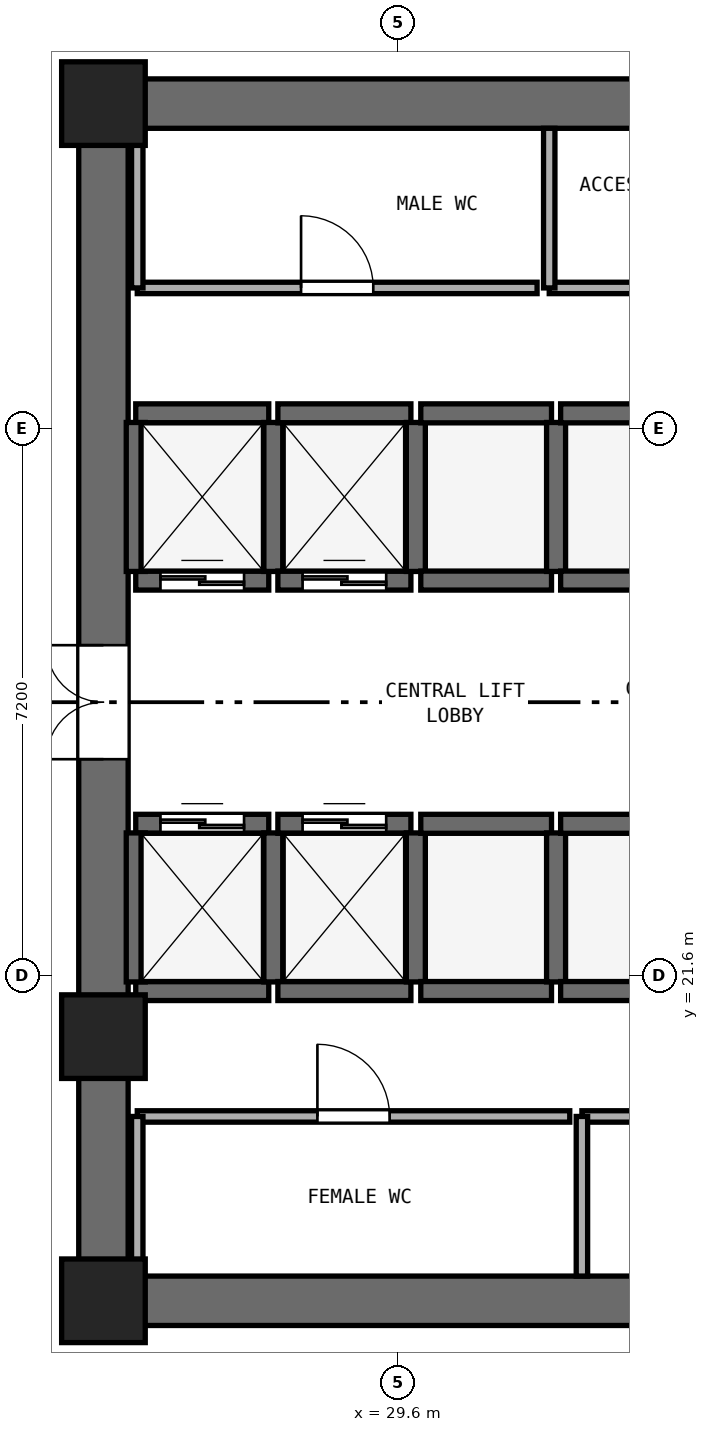
"""IFC4 building model, lengths in metres.
Left out: names, types, materials, properties, quantities, classifications, styles, units other than length and angle.
Written with IfcOpenShell. Run it as: python <this file> out.ifc"""

import sys

from ifc_helpers import new_model, si_unit, direction, frame, frame_2d, origin, origin_2d, place, context, subcontext, project, spatial, rectangle, extrude, element, fill, save


model = new_model("IFC4")
c1 = context("Model", 3, precision=1e-05, world=origin(), true_north=direction((0.0, 1.0)))
c2 = subcontext(c1, "Body", "Model", "MODEL_VIEW")
j1 = project(units=[si_unit("LENGTHUNIT", "METRE"), si_unit("PLANEANGLEUNIT", "RADIAN")], contexts=[c1])
p1 = place(None, origin())
s1 = spatial("IfcSite", under=j1, at=p1, CompositionType="ELEMENT")
p2 = place(p1, origin())
s2 = spatial("IfcBuilding", under=s1, at=p2, CompositionType="ELEMENT")
p3 = place(p2, frame((0.0, 0.0, 44.0)))
s3 = spatial("IfcBuildingStorey", under=s2, at=p3, CompositionType="ELEMENT", Elevation=44.0)
for number, where, z_axis, x_axis in (
    (1, (25.4, 17.325, 0.0), (0.0, 0.0, 1.0), (1.0, 0.0, 0.0)),
    (2, (25.4, 33.075, 0.0), (0.0, 0.0, 1.0), (1.0, 0.0, 0.0)),
):
    element("IfcWall", number, at=place(p3, frame(where, z_axis=z_axis, x_axis=x_axis)), inside=s3, PredefinedType="SHEAR", context=c2, shape_type="SweptSolid", body=[
        extrude(rectangle(XDim=23.2, YDim=0.65, at=frame_2d((11.6, 0.0))), origin(), (0.0, 0.0, 1.0), 3.525),
    ])
p4 = place(p3, frame((25.725, 17.65, 0.0), z_axis=(0.0, 0.0, 1.0), x_axis=(0.0, 1.0, 0.0)))
e3 = element("IfcWall", 3, at=p4, inside=s3, PredefinedType="SHEAR", context=c2, shape_type="SweptSolid", body=[
    extrude(rectangle(XDim=15.1, YDim=0.65, at=frame_2d((7.55, 0.0))), origin(), (0.0, 0.0, 1.0), 3.525),
])
p5 = place(p4, frame((6.8, 0.0, 0.0)))
e4 = element("IfcOpeningElement", 4, at=p5, cuts=e3, PredefinedType="OPENING", context=c2, shape_type="SweptSolid", body=[
    extrude(rectangle(XDim=1.5, YDim=2.15, at=frame_2d((0.75, 1.075))), frame((0.0, 0.335, 0.0), z_axis=(0.0, -1.0, 0.0), x_axis=(1.0, 0.0, 0.0)), (0.0, 0.0, 1.0), 0.67),
])
for number, where, z_axis, x_axis in (
    (5, (25.725, 17.325, 0.0), (0.0, 0.0, 1.0), (1.0, 0.0, 0.0)),
    (6, (25.725, 33.075, 0.0), (0.0, 0.0, 1.0), (1.0, 0.0, 0.0)),
    (7, (25.725, 20.8, 0.0), (0.0, 0.0, 1.0), (1.0, 0.0, 0.0)),
):
    element("IfcColumn", number, at=place(p3, frame(where, z_axis=z_axis, x_axis=x_axis)), inside=s3, PredefinedType="PILASTER", context=c2, shape_type="SweptSolid", body=[
        extrude(rectangle(XDim=1.1, YDim=1.1, at=origin_2d()), origin(), (0.0, 0.0, 1.0), 3.8),
    ])
p6 = place(p3, frame((26.15, 26.8, 0.0), z_axis=(0.0, 0.0, 1.0), x_axis=(1.0, 0.0, 0.0)))
e8 = element("IfcWall", 8, at=p6, inside=s3, PredefinedType="SHEAR", context=c2, shape_type="SweptSolid", body=[
    extrude(rectangle(XDim=1.75, YDim=0.25, at=frame_2d((0.875, 0.0))), origin(), (0.0, 0.0, 1.0), 3.525),
])
p7 = place(p6, frame((0.325, 0.0, 0.0)))
e9 = element("IfcOpeningElement", 9, at=p7, cuts=e8, PredefinedType="OPENING", context=c2, shape_type="SweptSolid", body=[
    extrude(rectangle(XDim=1.1, YDim=2.15, at=frame_2d((0.55, 1.075))), frame((0.0, 0.135, 0.0), z_axis=(0.0, -1.0, 0.0), x_axis=(1.0, 0.0, 0.0)), (0.0, 0.0, 1.0), 0.27),
])
p8 = place(p3, frame((26.15, 29.0, 0.0), z_axis=(0.0, 0.0, 1.0), x_axis=(1.0, 0.0, 0.0)))
e10 = element("IfcWall", 10, at=p8, inside=s3, PredefinedType="SHEAR", context=c2, shape_type="SweptSolid", body=[
    extrude(rectangle(XDim=1.75, YDim=0.25, at=frame_2d((0.875, 0.0))), origin(), (0.0, 0.0, 1.0), 3.525),
])
for number, where, z_axis, x_axis in (
    (11, (26.15, 26.92, 0.0), (0.0, 0.0, 1.0), (0.0, 1.0, 0.0)),
    (12, (27.96, 26.92, 0.0), (0.0, 0.0, 1.0), (0.0, 1.0, 0.0)),
):
    element("IfcWall", number, at=place(p3, frame(where, z_axis=z_axis, x_axis=x_axis)), inside=s3, PredefinedType="SHEAR", context=c2, shape_type="SweptSolid", body=[
        extrude(rectangle(XDim=1.96, YDim=0.25, at=frame_2d((0.98, 0.0))), origin(), (0.0, 0.0, 1.0), 3.525),
    ])
p9 = place(p3, frame((28.02, 26.8, 0.0), z_axis=(0.0, 0.0, 1.0), x_axis=(1.0, 0.0, 0.0)))
e13 = element("IfcWall", 13, at=p9, inside=s3, PredefinedType="SHEAR", context=c2, shape_type="SweptSolid", body=[
    extrude(rectangle(XDim=1.75, YDim=0.25, at=frame_2d((0.875, 0.0))), origin(), (0.0, 0.0, 1.0), 3.525),
])
p10 = place(p9, frame((0.325, 0.0, 0.0)))
e14 = element("IfcOpeningElement", 14, at=p10, cuts=e13, PredefinedType="OPENING", context=c2, shape_type="SweptSolid", body=[
    extrude(rectangle(XDim=1.1, YDim=2.15, at=frame_2d((0.55, 1.075))), frame((0.0, 0.135, 0.0), z_axis=(0.0, -1.0, 0.0), x_axis=(1.0, 0.0, 0.0)), (0.0, 0.0, 1.0), 0.27),
])
p11 = place(p3, frame((28.02, 29.0, 0.0), z_axis=(0.0, 0.0, 1.0), x_axis=(1.0, 0.0, 0.0)))
e15 = element("IfcWall", 15, at=p11, inside=s3, PredefinedType="SHEAR", context=c2, shape_type="SweptSolid", body=[
    extrude(rectangle(XDim=1.75, YDim=0.25, at=frame_2d((0.875, 0.0))), origin(), (0.0, 0.0, 1.0), 3.525),
])
p12 = place(p3, frame((29.835, 26.92, 0.0), z_axis=(0.0, 0.0, 1.0), x_axis=(0.0, 1.0, 0.0)))
e16 = element("IfcWall", 16, at=p12, inside=s3, PredefinedType="SHEAR", context=c2, shape_type="SweptSolid", body=[
    extrude(rectangle(XDim=1.96, YDim=0.25, at=frame_2d((0.98, 0.0))), origin(), (0.0, 0.0, 1.0), 3.525),
])
p13 = place(p3, frame((26.15, 21.4, 0.0), z_axis=(0.0, 0.0, 1.0), x_axis=(1.0, 0.0, 0.0)))
e17 = element("IfcWall", 17, at=p13, inside=s3, PredefinedType="SHEAR", context=c2, shape_type="SweptSolid", body=[
    extrude(rectangle(XDim=1.75, YDim=0.25, at=frame_2d((0.875, 0.0))), origin(), (0.0, 0.0, 1.0), 3.525),
])
p14 = place(p3, frame((26.15, 23.6, 0.0), z_axis=(0.0, 0.0, 1.0), x_axis=(1.0, 0.0, 0.0)))
e18 = element("IfcWall", 18, at=p14, inside=s3, PredefinedType="SHEAR", context=c2, shape_type="SweptSolid", body=[
    extrude(rectangle(XDim=1.75, YDim=0.25, at=frame_2d((0.875, 0.0))), origin(), (0.0, 0.0, 1.0), 3.525),
])
p15 = place(p14, frame((0.325, 0.0, 0.0)))
e19 = element("IfcOpeningElement", 19, at=p15, cuts=e18, PredefinedType="OPENING", context=c2, shape_type="SweptSolid", body=[
    extrude(rectangle(XDim=1.1, YDim=2.15, at=frame_2d((0.55, 1.075))), frame((0.0, 0.135, 0.0), z_axis=(0.0, -1.0, 0.0), x_axis=(1.0, 0.0, 0.0)), (0.0, 0.0, 1.0), 0.27),
])
for number, where, z_axis, x_axis in (
    (20, (26.15, 21.52, 0.0), (0.0, 0.0, 1.0), (0.0, 1.0, 0.0)),
    (21, (27.96, 21.52, 0.0), (0.0, 0.0, 1.0), (0.0, 1.0, 0.0)),
):
    element("IfcWall", number, at=place(p3, frame(where, z_axis=z_axis, x_axis=x_axis)), inside=s3, PredefinedType="SHEAR", context=c2, shape_type="SweptSolid", body=[
        extrude(rectangle(XDim=1.96, YDim=0.25, at=frame_2d((0.98, 0.0))), origin(), (0.0, 0.0, 1.0), 3.525),
    ])
p16 = place(p3, frame((28.02, 21.4, 0.0), z_axis=(0.0, 0.0, 1.0), x_axis=(1.0, 0.0, 0.0)))
e22 = element("IfcWall", 22, at=p16, inside=s3, PredefinedType="SHEAR", context=c2, shape_type="SweptSolid", body=[
    extrude(rectangle(XDim=1.75, YDim=0.25, at=frame_2d((0.875, 0.0))), origin(), (0.0, 0.0, 1.0), 3.525),
])
p17 = place(p3, frame((28.02, 23.6, 0.0), z_axis=(0.0, 0.0, 1.0), x_axis=(1.0, 0.0, 0.0)))
e23 = element("IfcWall", 23, at=p17, inside=s3, PredefinedType="SHEAR", context=c2, shape_type="SweptSolid", body=[
    extrude(rectangle(XDim=1.75, YDim=0.25, at=frame_2d((0.875, 0.0))), origin(), (0.0, 0.0, 1.0), 3.525),
])
p18 = place(p17, frame((0.325, 0.0, 0.0)))
e24 = element("IfcOpeningElement", 24, at=p18, cuts=e23, PredefinedType="OPENING", context=c2, shape_type="SweptSolid", body=[
    extrude(rectangle(XDim=1.1, YDim=2.15, at=frame_2d((0.55, 1.075))), frame((0.0, 0.135, 0.0), z_axis=(0.0, -1.0, 0.0), x_axis=(1.0, 0.0, 0.0)), (0.0, 0.0, 1.0), 0.27),
])
p19 = place(p3, frame((29.835, 21.52, 0.0), z_axis=(0.0, 0.0, 1.0), x_axis=(0.0, 1.0, 0.0)))
e25 = element("IfcWall", 25, at=p19, inside=s3, PredefinedType="SHEAR", context=c2, shape_type="SweptSolid", body=[
    extrude(rectangle(XDim=1.96, YDim=0.25, at=frame_2d((0.98, 0.0))), origin(), (0.0, 0.0, 1.0), 3.525),
])
for number, where, z_axis, x_axis in (
    (26, (29.9, 21.4, 0.0), (0.0, 0.0, 1.0), (1.0, 0.0, 0.0)),
    (27, (29.9, 23.6, 0.0), (0.0, 0.0, 1.0), (1.0, 0.0, 0.0)),
):
    element("IfcWall", number, at=place(p3, frame(where, z_axis=z_axis, x_axis=x_axis)), inside=s3, PredefinedType="SHEAR", context=c2, shape_type="SweptSolid", body=[
        extrude(rectangle(XDim=1.72, YDim=0.25, at=frame_2d((0.86, 0.0))), origin(), (0.0, 0.0, 1.0), 3.525),
    ])
p20 = place(p3, frame((31.68, 21.52, 0.0), z_axis=(0.0, 0.0, 1.0), x_axis=(0.0, 1.0, 0.0)))
e28 = element("IfcWall", 28, at=p20, inside=s3, PredefinedType="SHEAR", context=c2, shape_type="SweptSolid", body=[
    extrude(rectangle(XDim=1.96, YDim=0.25, at=frame_2d((0.98, 0.0))), origin(), (0.0, 0.0, 1.0), 3.525),
])
for number, where, z_axis, x_axis in (
    (29, (31.74, 21.4, 0.0), (0.0, 0.0, 1.0), (1.0, 0.0, 0.0)),
    (30, (31.74, 23.6, 0.0), (0.0, 0.0, 1.0), (1.0, 0.0, 0.0)),
):
    element("IfcWall", number, at=place(p3, frame(where, z_axis=z_axis, x_axis=x_axis)), inside=s3, PredefinedType="SHEAR", context=c2, shape_type="SweptSolid", body=[
        extrude(rectangle(XDim=1.72, YDim=0.25, at=frame_2d((0.86, 0.0))), origin(), (0.0, 0.0, 1.0), 3.525),
    ])
for number, where, z_axis, x_axis in (
    (31, (29.9, 26.8, 0.0), (0.0, 0.0, 1.0), (1.0, 0.0, 0.0)),
    (32, (29.9, 29.0, 0.0), (0.0, 0.0, 1.0), (1.0, 0.0, 0.0)),
):
    element("IfcWall", number, at=place(p3, frame(where, z_axis=z_axis, x_axis=x_axis)), inside=s3, PredefinedType="SHEAR", context=c2, shape_type="SweptSolid", body=[
        extrude(rectangle(XDim=1.72, YDim=0.25, at=frame_2d((0.86, 0.0))), origin(), (0.0, 0.0, 1.0), 3.525),
    ])
p21 = place(p3, frame((31.68, 26.92, 0.0), z_axis=(0.0, 0.0, 1.0), x_axis=(0.0, 1.0, 0.0)))
e33 = element("IfcWall", 33, at=p21, inside=s3, PredefinedType="SHEAR", context=c2, shape_type="SweptSolid", body=[
    extrude(rectangle(XDim=1.96, YDim=0.25, at=frame_2d((0.98, 0.0))), origin(), (0.0, 0.0, 1.0), 3.525),
])
for number, where, z_axis, x_axis in (
    (34, (31.74, 26.8, 0.0), (0.0, 0.0, 1.0), (1.0, 0.0, 0.0)),
    (35, (31.74, 29.0, 0.0), (0.0, 0.0, 1.0), (1.0, 0.0, 0.0)),
):
    element("IfcWall", number, at=place(p3, frame(where, z_axis=z_axis, x_axis=x_axis)), inside=s3, PredefinedType="SHEAR", context=c2, shape_type="SweptSolid", body=[
        extrude(rectangle(XDim=1.72, YDim=0.25, at=frame_2d((0.86, 0.0))), origin(), (0.0, 0.0, 1.0), 3.525),
    ])
p22 = place(p3, frame((26.17, 30.65, 0.0), z_axis=(0.0, 0.0, 1.0), x_axis=(1.0, 0.0, 0.0)))
e36 = element("IfcWall", 36, at=p22, inside=s3, PredefinedType="PARTITIONING", context=c2, shape_type="SweptSolid", body=[
    extrude(rectangle(XDim=5.26, YDim=0.15, at=frame_2d((2.63, 0.0))), origin(), (0.0, 0.0, 1.0), 3.525),
])
p23 = place(p22, frame((2.155, 0.0, 0.0)))
e37 = element("IfcOpeningElement", 37, at=p23, cuts=e36, PredefinedType="OPENING", context=c2, shape_type="SweptSolid", body=[
    extrude(rectangle(XDim=0.95, YDim=2.1, at=frame_2d((0.475, 1.05))), frame((0.0, 0.085, 0.0), z_axis=(0.0, -1.0, 0.0), x_axis=(1.0, 0.0, 0.0)), (0.0, 0.0, 1.0), 0.17),
])
p24 = place(p3, frame((26.17, 30.65, 0.0), z_axis=(0.0, 0.0, 1.0), x_axis=(0.0, 1.0, 0.0)))
e38 = element("IfcWall", 38, at=p24, inside=s3, PredefinedType="PARTITIONING", context=c2, shape_type="SweptSolid", body=[
    extrude(rectangle(XDim=2.1, YDim=0.15, at=frame_2d((1.05, 0.0))), origin(), (0.0, 0.0, 1.0), 3.525),
])
p25 = place(p3, frame((31.59, 30.65, 0.0), z_axis=(0.0, 0.0, 1.0), x_axis=(1.0, 0.0, 0.0)))
e39 = element("IfcWall", 39, at=p25, inside=s3, PredefinedType="PARTITIONING", context=c2, shape_type="SweptSolid", body=[
    extrude(rectangle(XDim=5.26, YDim=0.15, at=frame_2d((2.63, 0.0))), origin(), (0.0, 0.0, 1.0), 3.525),
])
p26 = place(p25, frame((2.155, 0.0, 0.0)))
e40 = element("IfcOpeningElement", 40, at=p26, cuts=e39, PredefinedType="OPENING", context=c2, shape_type="SweptSolid", body=[
    extrude(rectangle(XDim=0.95, YDim=2.1, at=frame_2d((0.475, 1.05))), frame((0.0, 0.085, 0.0), z_axis=(0.0, -1.0, 0.0), x_axis=(1.0, 0.0, 0.0)), (0.0, 0.0, 1.0), 0.17),
])
p27 = place(p3, frame((31.59, 30.65, 0.0), z_axis=(0.0, 0.0, 1.0), x_axis=(0.0, 1.0, 0.0)))
e41 = element("IfcWall", 41, at=p27, inside=s3, PredefinedType="PARTITIONING", context=c2, shape_type="SweptSolid", body=[
    extrude(rectangle(XDim=2.1, YDim=0.15, at=frame_2d((1.05, 0.0))), origin(), (0.0, 0.0, 1.0), 3.525),
])
p28 = place(p3, frame((26.17, 19.75, 0.0), z_axis=(0.0, 0.0, 1.0), x_axis=(1.0, 0.0, 0.0)))
e42 = element("IfcWall", 42, at=p28, inside=s3, PredefinedType="PARTITIONING", context=c2, shape_type="SweptSolid", body=[
    extrude(rectangle(XDim=5.69, YDim=0.15, at=frame_2d((2.845, 0.0))), origin(), (0.0, 0.0, 1.0), 3.525),
])
p29 = place(p28, frame((2.37, 0.0, 0.0)))
e43 = element("IfcOpeningElement", 43, at=p29, cuts=e42, PredefinedType="OPENING", context=c2, shape_type="SweptSolid", body=[
    extrude(rectangle(XDim=0.95, YDim=2.1, at=frame_2d((0.475, 1.05))), frame((0.0, 0.085, 0.0), z_axis=(0.0, -1.0, 0.0), x_axis=(1.0, 0.0, 0.0)), (0.0, 0.0, 1.0), 0.17),
])
p30 = place(p3, frame((26.17, 17.65, 0.0), z_axis=(0.0, 0.0, 1.0), x_axis=(0.0, 1.0, 0.0)))
e44 = element("IfcWall", 44, at=p30, inside=s3, PredefinedType="PARTITIONING", context=c2, shape_type="SweptSolid", body=[
    extrude(rectangle(XDim=2.1, YDim=0.15, at=frame_2d((1.05, 0.0))), origin(), (0.0, 0.0, 1.0), 3.525),
])
p31 = place(p3, frame((32.02, 19.75, 0.0), z_axis=(0.0, 0.0, 1.0), x_axis=(1.0, 0.0, 0.0)))
e45 = element("IfcWall", 45, at=p31, inside=s3, PredefinedType="PARTITIONING", context=c2, shape_type="SweptSolid", body=[
    extrude(rectangle(XDim=4.83, YDim=0.15, at=frame_2d((2.415, 0.0))), origin(), (0.0, 0.0, 1.0), 3.525),
])
p32 = place(p31, frame((1.965, 0.0, 0.0)))
e46 = element("IfcOpeningElement", 46, at=p32, cuts=e45, PredefinedType="OPENING", context=c2, shape_type="SweptSolid", body=[
    extrude(rectangle(XDim=0.9, YDim=2.1, at=frame_2d((0.45, 1.05))), frame((0.0, 0.085, 0.0), z_axis=(0.0, -1.0, 0.0), x_axis=(1.0, 0.0, 0.0)), (0.0, 0.0, 1.0), 0.17),
])
p33 = place(p3, frame((32.02, 17.65, 0.0), z_axis=(0.0, 0.0, 1.0), x_axis=(0.0, 1.0, 0.0)))
e47 = element("IfcWall", 47, at=p33, inside=s3, PredefinedType="PARTITIONING", context=c2, shape_type="SweptSolid", body=[
    extrude(rectangle(XDim=2.1, YDim=0.15, at=frame_2d((1.05, 0.0))), origin(), (0.0, 0.0, 1.0), 3.525),
])
p34 = place(p7, origin())
e48 = element("IfcDoor", 48, at=p34, inside=s3, OperationType="DOUBLE_DOOR_SLIDING", PredefinedType="DOOR", context=c2, shape_type="SweptSolid", body=[
    extrude(rectangle(XDim=1.1, YDim=2.15, at=frame_2d((0.55, 1.075))), frame((0.0, 0.025, 0.0), z_axis=(0.0, -1.0, 0.0), x_axis=(1.0, 0.0, 0.0)), (0.0, 0.0, 1.0), 0.05),
])
fill(e9, e48)
p35 = place(p10, origin())
e49 = element("IfcDoor", 49, at=p35, inside=s3, OperationType="DOUBLE_DOOR_SLIDING", PredefinedType="DOOR", context=c2, shape_type="SweptSolid", body=[
    extrude(rectangle(XDim=1.1, YDim=2.15, at=frame_2d((0.55, 1.075))), frame((0.0, 0.025, 0.0), z_axis=(0.0, -1.0, 0.0), x_axis=(1.0, 0.0, 0.0)), (0.0, 0.0, 1.0), 0.05),
])
fill(e14, e49)
p36 = place(p15, origin())
e50 = element("IfcDoor", 50, at=p36, inside=s3, OperationType="DOUBLE_DOOR_SLIDING", PredefinedType="DOOR", context=c2, shape_type="SweptSolid", body=[
    extrude(rectangle(XDim=1.1, YDim=2.15, at=frame_2d((0.55, 1.075))), frame((0.0, 0.025, 0.0), z_axis=(0.0, -1.0, 0.0), x_axis=(1.0, 0.0, 0.0)), (0.0, 0.0, 1.0), 0.05),
])
fill(e19, e50)
p37 = place(p18, origin())
e51 = element("IfcDoor", 51, at=p37, inside=s3, OperationType="DOUBLE_DOOR_SLIDING", PredefinedType="DOOR", context=c2, shape_type="SweptSolid", body=[
    extrude(rectangle(XDim=1.1, YDim=2.15, at=frame_2d((0.55, 1.075))), frame((0.0, 0.025, 0.0), z_axis=(0.0, -1.0, 0.0), x_axis=(1.0, 0.0, 0.0)), (0.0, 0.0, 1.0), 0.05),
])
fill(e24, e51)
p38 = place(p5, origin())
e52 = element("IfcDoor", 52, at=p38, inside=s3, OperationType="DOUBLE_DOOR_SINGLE_SWING", PredefinedType="DOOR", context=c2, shape_type="SweptSolid", body=[
    extrude(rectangle(XDim=1.5, YDim=2.15, at=frame_2d((0.75, 1.075))), frame((0.0, 0.025, 0.0), z_axis=(0.0, -1.0, 0.0), x_axis=(1.0, 0.0, 0.0)), (0.0, 0.0, 1.0), 0.05),
])
fill(e4, e52)
p39 = place(p23, origin())
e53 = element("IfcDoor", 53, at=p39, inside=s3, OperationType="SINGLE_SWING_LEFT", PredefinedType="DOOR", context=c2, shape_type="SweptSolid", body=[
    extrude(rectangle(XDim=0.95, YDim=2.1, at=frame_2d((0.475, 1.05))), frame((0.0, 0.025, 0.0), z_axis=(0.0, -1.0, 0.0), x_axis=(1.0, 0.0, 0.0)), (0.0, 0.0, 1.0), 0.05),
])
fill(e37, e53)
p40 = place(p29, origin())
e54 = element("IfcDoor", 54, at=p40, inside=s3, OperationType="SINGLE_SWING_LEFT", PredefinedType="DOOR", context=c2, shape_type="SweptSolid", body=[
    extrude(rectangle(XDim=0.95, YDim=2.1, at=frame_2d((0.475, 1.05))), frame((0.0, 0.025, 0.0), z_axis=(0.0, -1.0, 0.0), x_axis=(1.0, 0.0, 0.0)), (0.0, 0.0, 1.0), 0.05),
])
fill(e43, e54)
save(model, sys.argv[1])
